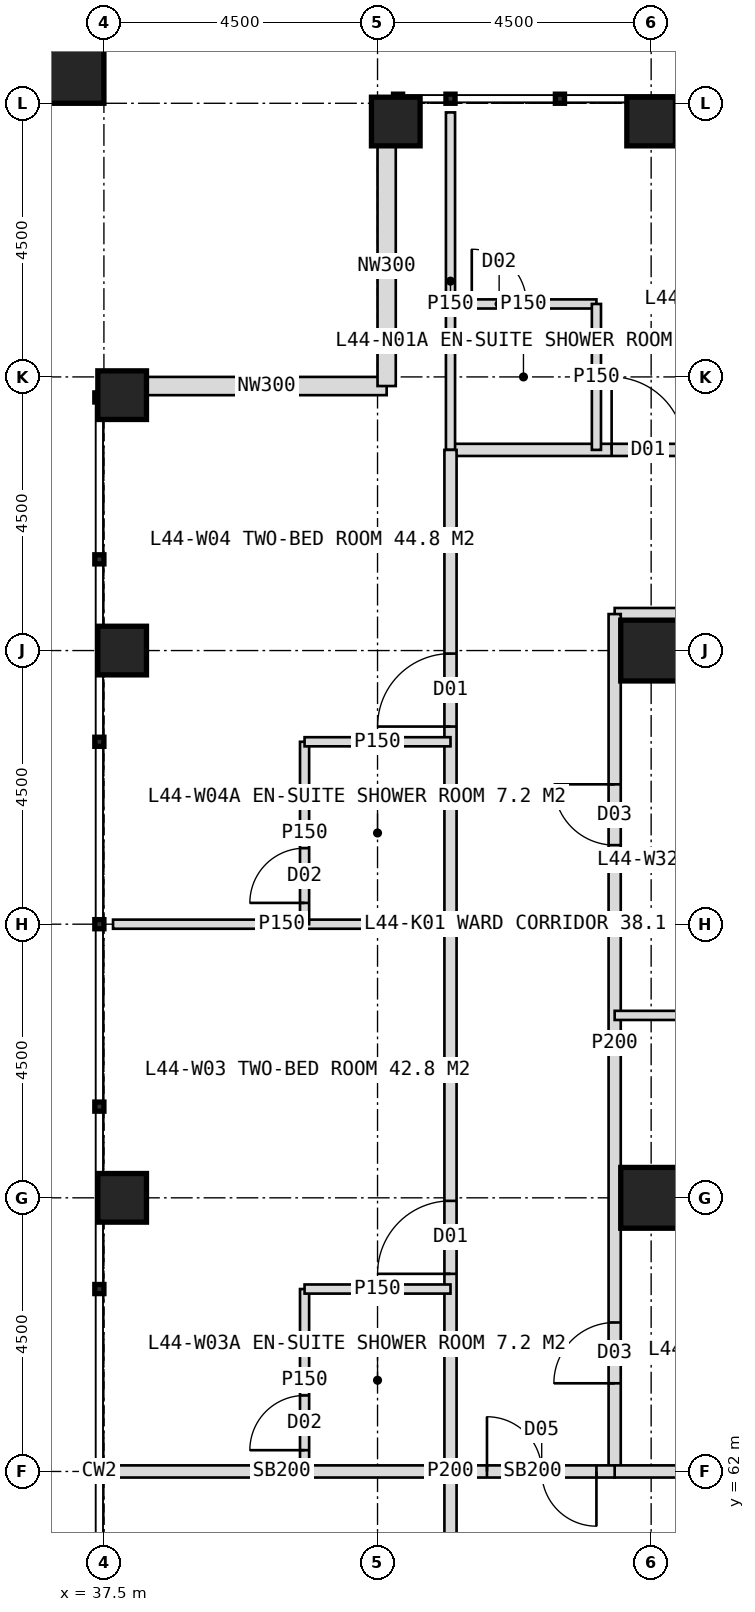
"""IFC4 building model, lengths in metres.
Left out: names, types, materials, properties, quantities, classifications, styles, units other than length and angle.
Written with IfcOpenShell. Run it as: python <this file> out.ifc"""

import sys

from ifc_helpers import new_model, si_unit, direction, frame, frame_2d, origin, origin_2d, place, context, subcontext, project, spatial, rectangle, hollow_rectangle, extrude, element, fill, save


model = new_model("IFC4")
c1 = context("Model", 3, precision=1e-05, world=origin(), true_north=direction((0.0, 1.0)))
c2 = subcontext(c1, "Body", "Model", "MODEL_VIEW")
j1 = project(units=[si_unit("LENGTHUNIT", "METRE"), si_unit("PLANEANGLEUNIT", "RADIAN")], contexts=[c1])
p1 = place(None, origin())
s1 = spatial("IfcSite", under=j1, at=p1, CompositionType="ELEMENT")
p2 = place(p1, origin())
s2 = spatial("IfcBuilding", under=s1, at=p2, CompositionType="ELEMENT")
p3 = place(p2, frame((0.0, 0.0, 185.0)))
s3 = spatial("IfcBuildingStorey", under=s2, at=p3, CompositionType="ELEMENT", Elevation=185.0)
for number, where, z_axis, x_axis in (
    (1, (46.5, 75.5, 0.0), (0.0, 0.0, 1.0), (1.0, 0.0, 0.0)),
    (2, (46.5, 66.5, 0.0), (0.0, 0.0, 1.0), (1.0, 0.0, 0.0)),
):
    element("IfcColumn", number, at=place(p3, frame(where, z_axis=z_axis, x_axis=x_axis)), inside=s3, PredefinedType="COLUMN", context=c2, shape_type="SweptSolid", body=[
        extrude(hollow_rectangle(XDim=1.0, YDim=1.0, WallThickness=0.1, at=origin_2d()), origin(), (0.0, 0.0, 1.0), 4.0),
    ])
for number, where, z_axis, x_axis in (
    (3, (42.3, 84.2, 0.0), (0.0, 0.0, 1.0), (1.0, 0.0, 0.0)),
    (4, (46.5, 84.2, 0.0), (0.0, 0.0, 1.0), (1.0, 0.0, 0.0)),
    (5, (37.8, 66.5, 0.0), (0.0, 0.0, 1.0), (1.0, 0.0, 0.0)),
    (6, (37.8, 75.5, 0.0), (0.0, 0.0, 1.0), (1.0, 0.0, 0.0)),
    (7, (37.8, 79.7, 0.0), (0.0, 0.0, 1.0), (1.0, 0.0, 0.0)),
):
    element("IfcColumn", number, at=place(p3, frame(where, z_axis=z_axis, x_axis=x_axis)), inside=s3, PredefinedType="COLUMN", context=c2, shape_type="SweptSolid", body=[
        extrude(hollow_rectangle(XDim=0.8, YDim=0.8, WallThickness=0.08, at=origin_2d()), origin(), (0.0, 0.0, 1.0), 4.0),
    ])
p4 = place(p3, frame((36.9, 85.1, 0.0), z_axis=(0.0, 0.0, 1.0), x_axis=(1.0, 0.0, 0.0)))
e8 = element("IfcColumn", 8, at=p4, inside=s3, PredefinedType="COLUMN", context=c2, shape_type="SweptSolid", body=[
    extrude(hollow_rectangle(XDim=1.2, YDim=1.2, WallThickness=0.07, at=origin_2d()), origin(), (0.0, 0.0, 1.0), 4.0),
])
for number, where, z_axis, x_axis in (
    (9, (38.2, 79.85, 0.0), (0.0, 0.0, 1.0), (1.0, 0.0, 0.0)),
    (10, (42.15, 79.85, 0.0), (0.0, 0.0, 1.0), (0.0, 1.0, 0.0)),
):
    element("IfcWall", number, at=place(p3, frame(where, z_axis=z_axis, x_axis=x_axis)), inside=s3, PredefinedType="ELEMENTEDWALL", context=c2, shape_type="SweptSolid", body=[
        extrude(rectangle(XDim=3.95, YDim=0.3, at=frame_2d((1.975, 0.0))), origin(), (0.0, 0.0, 1.0), 2.85),
    ])
p5 = place(p3, frame((43.2, 78.8, 0.0), z_axis=(0.0, 0.0, 1.0), x_axis=(1.0, 0.0, 0.0)))
e11 = element("IfcWall", 11, at=p5, inside=s3, PredefinedType="PARTITIONING", context=c2, shape_type="SweptSolid", body=[
    extrude(rectangle(XDim=33.6, YDim=0.2, at=frame_2d((16.8, 0.0))), origin(), (0.0, 0.0, 1.0), 3.75),
])
p6 = place(p5, frame((2.65, 0.0, 0.0)))
e12 = element("IfcOpeningElement", 12, at=p6, cuts=e11, PredefinedType="OPENING", context=c2, shape_type="SweptSolid", body=[
    extrude(rectangle(XDim=1.2, YDim=2.2, at=frame_2d((0.6, 1.1))), frame((0.0, 0.11, 0.0), z_axis=(0.0, -1.0, 0.0), x_axis=(1.0, 0.0, 0.0)), (0.0, 0.0, 1.0), 0.22),
])
p7 = place(p5, frame((14.05, 0.0, 0.0)))
e13 = element("IfcOpeningElement", 13, at=p7, cuts=e11, PredefinedType="OPENING", context=c2, shape_type="SweptSolid", body=[
    extrude(rectangle(XDim=1.2, YDim=2.2, at=frame_2d((0.6, 1.1))), frame((0.0, 0.11, 0.0), z_axis=(0.0, -1.0, 0.0), x_axis=(1.0, 0.0, 0.0)), (0.0, 0.0, 1.0), 0.22),
])
p8 = place(p5, frame((22.45, 0.0, 0.0)))
e14 = element("IfcOpeningElement", 14, at=p8, cuts=e11, PredefinedType="OPENING", context=c2, shape_type="SweptSolid", body=[
    extrude(rectangle(XDim=1.2, YDim=2.2, at=frame_2d((0.6, 1.1))), frame((0.0, 0.11, 0.0), z_axis=(0.0, -1.0, 0.0), x_axis=(1.0, 0.0, 0.0)), (0.0, 0.0, 1.0), 0.22),
])
p9 = place(p5, frame((29.2, 0.0, 0.0)))
e15 = element("IfcOpeningElement", 15, at=p9, cuts=e11, PredefinedType="OPENING", context=c2, shape_type="SweptSolid", body=[
    extrude(rectangle(XDim=1.0, YDim=2.1, at=frame_2d((0.5, 1.05))), frame((0.0, 0.11, 0.0), z_axis=(0.0, -1.0, 0.0), x_axis=(1.0, 0.0, 0.0)), (0.0, 0.0, 1.0), 0.22),
])
p10 = place(p3, frame((43.2, 78.8, 0.0), z_axis=(0.0, 0.0, 1.0), x_axis=(0.0, 1.0, 0.0)))
e16 = element("IfcWall", 16, at=p10, inside=s3, PredefinedType="PARTITIONING", context=c2, shape_type="SweptSolid", body=[
    extrude(rectangle(XDim=5.55, YDim=0.15, at=frame_2d((2.775, 0.0))), origin(), (0.0, 0.0, 1.0), 3.75),
])
p11 = place(p3, frame((43.2, 81.2, 0.0), z_axis=(0.0, 0.0, 1.0), x_axis=(1.0, 0.0, 0.0)))
e17 = element("IfcWall", 17, at=p11, inside=s3, PredefinedType="PARTITIONING", context=c2, shape_type="SweptSolid", body=[
    extrude(rectangle(XDim=2.4, YDim=0.15, at=frame_2d((1.2, 0.0))), origin(), (0.0, 0.0, 1.0), 3.75),
])
p12 = place(p11, frame((0.35, 0.0, 0.0)))
e18 = element("IfcOpeningElement", 18, at=p12, cuts=e17, PredefinedType="OPENING", context=c2, shape_type="SweptSolid", body=[
    extrude(rectangle(XDim=0.9, YDim=2.1, at=frame_2d((0.45, 1.05))), frame((0.0, 0.085, 0.0), z_axis=(0.0, -1.0, 0.0), x_axis=(1.0, 0.0, 0.0)), (0.0, 0.0, 1.0), 0.17),
])
p13 = place(p3, frame((45.6, 78.8, 0.0), z_axis=(0.0, 0.0, 1.0), x_axis=(0.0, 1.0, 0.0)))
e19 = element("IfcWall", 19, at=p13, inside=s3, PredefinedType="PARTITIONING", context=c2, shape_type="SweptSolid", body=[
    extrude(rectangle(XDim=2.4, YDim=0.15, at=frame_2d((1.2, 0.0))), origin(), (0.0, 0.0, 1.0), 3.75),
])
p14 = place(p3, frame((45.9, 76.1, 0.0), z_axis=(0.0, 0.0, 1.0), x_axis=(1.0, 0.0, 0.0)))
e20 = element("IfcWall", 20, at=p14, inside=s3, PredefinedType="PARTITIONING", context=c2, shape_type="SweptSolid", body=[
    extrude(rectangle(XDim=5.1, YDim=0.2, at=frame_2d((2.55, 0.0))), origin(), (0.0, 0.0, 1.0), 3.75),
])
p15 = place(p3, frame((43.2, 62.0, 0.0), z_axis=(0.0, 0.0, 1.0), x_axis=(-1.0, 0.0, 0.0)))
e21 = element("IfcWall", 21, at=p15, inside=s3, PredefinedType="SOLIDWALL", context=c2, shape_type="SweptSolid", body=[
    extrude(rectangle(XDim=5.55, YDim=0.2, at=frame_2d((2.775, 0.0))), origin(), (0.0, 0.0, 1.0), 2.95),
])
p16 = place(p3, frame((43.2, 71.0, 0.0), z_axis=(0.0, 0.0, 1.0), x_axis=(-1.0, 0.0, 0.0)))
e22 = element("IfcWall", 22, at=p16, inside=s3, PredefinedType="PARTITIONING", context=c2, shape_type="SweptSolid", body=[
    extrude(rectangle(XDim=5.55, YDim=0.15, at=frame_2d((2.775, 0.0))), origin(), (0.0, 0.0, 1.0), 3.75),
])
p17 = place(p3, frame((43.2, 45.2, 0.0), z_axis=(0.0, 0.0, 1.0), x_axis=(0.0, 1.0, 0.0)))
e23 = element("IfcWall", 23, at=p17, inside=s3, PredefinedType="PARTITIONING", context=c2, shape_type="SweptSolid", body=[
    extrude(rectangle(XDim=33.6, YDim=0.2, at=frame_2d((16.8, 0.0))), origin(), (0.0, 0.0, 1.0), 3.75),
])
p18 = place(p17, frame((2.65, 0.0, 0.0)))
e24 = element("IfcOpeningElement", 24, at=p18, cuts=e23, PredefinedType="OPENING", context=c2, shape_type="SweptSolid", body=[
    extrude(rectangle(XDim=1.2, YDim=2.2, at=frame_2d((0.6, 1.1))), frame((0.0, 0.11, 0.0), z_axis=(0.0, -1.0, 0.0), x_axis=(1.0, 0.0, 0.0)), (0.0, 0.0, 1.0), 0.22),
])
p19 = place(p17, frame((13.45, 0.0, 0.0)))
e25 = element("IfcOpeningElement", 25, at=p19, cuts=e23, PredefinedType="OPENING", context=c2, shape_type="SweptSolid", body=[
    extrude(rectangle(XDim=1.2, YDim=2.2, at=frame_2d((0.6, 1.1))), frame((0.0, 0.11, 0.0), z_axis=(0.0, -1.0, 0.0), x_axis=(1.0, 0.0, 0.0)), (0.0, 0.0, 1.0), 0.22),
])
p20 = place(p17, frame((20.05, 0.0, 0.0)))
e26 = element("IfcOpeningElement", 26, at=p20, cuts=e23, PredefinedType="OPENING", context=c2, shape_type="SweptSolid", body=[
    extrude(rectangle(XDim=1.2, YDim=2.2, at=frame_2d((0.6, 1.1))), frame((0.0, 0.11, 0.0), z_axis=(0.0, -1.0, 0.0), x_axis=(1.0, 0.0, 0.0)), (0.0, 0.0, 1.0), 0.22),
])
p21 = place(p17, frame((29.05, 0.0, 0.0)))
e27 = element("IfcOpeningElement", 27, at=p21, cuts=e23, PredefinedType="OPENING", context=c2, shape_type="SweptSolid", body=[
    extrude(rectangle(XDim=1.2, YDim=2.2, at=frame_2d((0.6, 1.1))), frame((0.0, 0.11, 0.0), z_axis=(0.0, -1.0, 0.0), x_axis=(1.0, 0.0, 0.0)), (0.0, 0.0, 1.0), 0.22),
])
p22 = place(p3, frame((40.8, 62.0, 0.0), z_axis=(0.0, 0.0, 1.0), x_axis=(0.0, 1.0, 0.0)))
e28 = element("IfcWall", 28, at=p22, inside=s3, PredefinedType="PARTITIONING", context=c2, shape_type="SweptSolid", body=[
    extrude(rectangle(XDim=3.0, YDim=0.15, at=frame_2d((1.5, 0.0))), origin(), (0.0, 0.0, 1.0), 3.75),
])
p23 = place(p22, frame((0.35, 0.0, 0.0)))
e29 = element("IfcOpeningElement", 29, at=p23, cuts=e28, PredefinedType="OPENING", context=c2, shape_type="SweptSolid", body=[
    extrude(rectangle(XDim=0.9, YDim=2.1, at=frame_2d((0.45, 1.05))), frame((0.0, 0.085, 0.0), z_axis=(0.0, -1.0, 0.0), x_axis=(1.0, 0.0, 0.0)), (0.0, 0.0, 1.0), 0.17),
])
p24 = place(p3, frame((43.2, 65.0, 0.0), z_axis=(0.0, 0.0, 1.0), x_axis=(-1.0, 0.0, 0.0)))
e30 = element("IfcWall", 30, at=p24, inside=s3, PredefinedType="PARTITIONING", context=c2, shape_type="SweptSolid", body=[
    extrude(rectangle(XDim=2.4, YDim=0.15, at=frame_2d((1.2, 0.0))), origin(), (0.0, 0.0, 1.0), 3.75),
])
p25 = place(p3, frame((40.8, 71.0, 0.0), z_axis=(0.0, 0.0, 1.0), x_axis=(0.0, 1.0, 0.0)))
e31 = element("IfcWall", 31, at=p25, inside=s3, PredefinedType="PARTITIONING", context=c2, shape_type="SweptSolid", body=[
    extrude(rectangle(XDim=3.0, YDim=0.15, at=frame_2d((1.5, 0.0))), origin(), (0.0, 0.0, 1.0), 3.75),
])
p26 = place(p25, frame((0.35, 0.0, 0.0)))
e32 = element("IfcOpeningElement", 32, at=p26, cuts=e31, PredefinedType="OPENING", context=c2, shape_type="SweptSolid", body=[
    extrude(rectangle(XDim=0.9, YDim=2.1, at=frame_2d((0.45, 1.05))), frame((0.0, 0.085, 0.0), z_axis=(0.0, -1.0, 0.0), x_axis=(1.0, 0.0, 0.0)), (0.0, 0.0, 1.0), 0.17),
])
p27 = place(p3, frame((43.2, 74.0, 0.0), z_axis=(0.0, 0.0, 1.0), x_axis=(-1.0, 0.0, 0.0)))
e33 = element("IfcWall", 33, at=p27, inside=s3, PredefinedType="PARTITIONING", context=c2, shape_type="SweptSolid", body=[
    extrude(rectangle(XDim=2.4, YDim=0.15, at=frame_2d((1.2, 0.0))), origin(), (0.0, 0.0, 1.0), 3.75),
])
p28 = place(p3, frame((45.9, 62.0, 0.0), z_axis=(0.0, 0.0, 1.0), x_axis=(0.0, 1.0, 0.0)))
e34 = element("IfcWall", 34, at=p28, inside=s3, PredefinedType="PARTITIONING", context=c2, shape_type="SweptSolid", body=[
    extrude(rectangle(XDim=14.1, YDim=0.2, at=frame_2d((7.05, 0.0))), origin(), (0.0, 0.0, 1.0), 3.75),
])
p29 = place(p28, frame((1.45, 0.0, 0.0)))
e35 = element("IfcOpeningElement", 35, at=p29, cuts=e34, PredefinedType="OPENING", context=c2, shape_type="SweptSolid", body=[
    extrude(rectangle(XDim=1.0, YDim=2.1, at=frame_2d((0.5, 1.05))), frame((0.0, 0.11, 0.0), z_axis=(0.0, -1.0, 0.0), x_axis=(1.0, 0.0, 0.0)), (0.0, 0.0, 1.0), 0.22),
])
p30 = place(p28, frame((10.3, 0.0, 0.0)))
e36 = element("IfcOpeningElement", 36, at=p30, cuts=e34, PredefinedType="OPENING", context=c2, shape_type="SweptSolid", body=[
    extrude(rectangle(XDim=1.0, YDim=2.1, at=frame_2d((0.5, 1.05))), frame((0.0, 0.11, 0.0), z_axis=(0.0, -1.0, 0.0), x_axis=(1.0, 0.0, 0.0)), (0.0, 0.0, 1.0), 0.22),
])
p31 = place(p3, frame((51.0, 62.0, 0.0), z_axis=(0.0, 0.0, 1.0), x_axis=(-1.0, 0.0, 0.0)))
e37 = element("IfcWall", 37, at=p31, inside=s3, PredefinedType="SOLIDWALL", context=c2, shape_type="SweptSolid", body=[
    extrude(rectangle(XDim=5.1, YDim=0.2, at=frame_2d((2.55, 0.0))), origin(), (0.0, 0.0, 1.0), 2.95),
])
p32 = place(p3, frame((51.0, 69.5, 0.0), z_axis=(0.0, 0.0, 1.0), x_axis=(-1.0, 0.0, 0.0)))
e38 = element("IfcWall", 38, at=p32, inside=s3, PredefinedType="PARTITIONING", context=c2, shape_type="SweptSolid", body=[
    extrude(rectangle(XDim=5.1, YDim=0.15, at=frame_2d((2.55, 0.0))), origin(), (0.0, 0.0, 1.0), 3.75),
])
p33 = place(p3, frame((45.9, 62.0, 0.0), z_axis=(0.0, 0.0, 1.0), x_axis=(-1.0, 0.0, 0.0)))
e39 = element("IfcWall", 39, at=p33, inside=s3, PredefinedType="SOLIDWALL", context=c2, shape_type="SweptSolid", body=[
    extrude(rectangle(XDim=2.7, YDim=0.2, at=frame_2d((1.35, 0.0))), origin(), (0.0, 0.0, 1.0), 2.95),
])
p34 = place(p33, frame((0.3, 0.0, 0.0)))
e40 = element("IfcOpeningElement", 40, at=p34, cuts=e39, PredefinedType="OPENING", context=c2, shape_type="SweptSolid", body=[
    extrude(rectangle(XDim=1.8, YDim=2.2, at=frame_2d((0.9, 1.1))), frame((0.0, 0.11, 0.0), z_axis=(0.0, -1.0, 0.0), x_axis=(1.0, 0.0, 0.0)), (0.0, 0.0, 1.0), 0.22),
])
p35 = place(p6, origin())
e41 = element("IfcDoor", 41, at=p35, inside=s3, OperationType="SINGLE_SWING_LEFT", PredefinedType="DOOR", context=c2, shape_type="SweptSolid", body=[
    extrude(rectangle(XDim=1.2, YDim=2.2, at=frame_2d((0.6, 1.1))), frame((0.0, 0.025, 0.0), z_axis=(0.0, -1.0, 0.0), x_axis=(1.0, 0.0, 0.0)), (0.0, 0.0, 1.0), 0.05),
])
fill(e12, e41)
p36 = place(p12, origin())
e42 = element("IfcDoor", 42, at=p36, inside=s3, OperationType="SINGLE_SWING_LEFT", PredefinedType="DOOR", context=c2, shape_type="SweptSolid", body=[
    extrude(rectangle(XDim=0.9, YDim=2.1, at=frame_2d((0.45, 1.05))), frame((0.0, 0.025, 0.0), z_axis=(0.0, -1.0, 0.0), x_axis=(1.0, 0.0, 0.0)), (0.0, 0.0, 1.0), 0.05),
])
fill(e18, e42)
p37 = place(p20, origin())
e43 = element("IfcDoor", 43, at=p37, inside=s3, OperationType="SINGLE_SWING_LEFT", PredefinedType="DOOR", context=c2, shape_type="SweptSolid", body=[
    extrude(rectangle(XDim=1.2, YDim=2.2, at=frame_2d((0.6, 1.1))), frame((0.0, 0.025, 0.0), z_axis=(0.0, -1.0, 0.0), x_axis=(1.0, 0.0, 0.0)), (0.0, 0.0, 1.0), 0.05),
])
fill(e26, e43)
p38 = place(p23, origin())
e44 = element("IfcDoor", 44, at=p38, inside=s3, OperationType="SINGLE_SWING_LEFT", PredefinedType="DOOR", context=c2, shape_type="SweptSolid", body=[
    extrude(rectangle(XDim=0.9, YDim=2.1, at=frame_2d((0.45, 1.05))), frame((0.0, 0.025, 0.0), z_axis=(0.0, -1.0, 0.0), x_axis=(1.0, 0.0, 0.0)), (0.0, 0.0, 1.0), 0.05),
])
fill(e29, e44)
p39 = place(p21, origin())
e45 = element("IfcDoor", 45, at=p39, inside=s3, OperationType="SINGLE_SWING_LEFT", PredefinedType="DOOR", context=c2, shape_type="SweptSolid", body=[
    extrude(rectangle(XDim=1.2, YDim=2.2, at=frame_2d((0.6, 1.1))), frame((0.0, 0.025, 0.0), z_axis=(0.0, -1.0, 0.0), x_axis=(1.0, 0.0, 0.0)), (0.0, 0.0, 1.0), 0.05),
])
fill(e27, e45)
p40 = place(p26, origin())
e46 = element("IfcDoor", 46, at=p40, inside=s3, OperationType="SINGLE_SWING_LEFT", PredefinedType="DOOR", context=c2, shape_type="SweptSolid", body=[
    extrude(rectangle(XDim=0.9, YDim=2.1, at=frame_2d((0.45, 1.05))), frame((0.0, 0.025, 0.0), z_axis=(0.0, -1.0, 0.0), x_axis=(1.0, 0.0, 0.0)), (0.0, 0.0, 1.0), 0.05),
])
fill(e32, e46)
p41 = place(p29, origin())
e47 = element("IfcDoor", 47, at=p41, inside=s3, OperationType="SINGLE_SWING_LEFT", PredefinedType="DOOR", context=c2, shape_type="SweptSolid", body=[
    extrude(rectangle(XDim=1.0, YDim=2.1, at=frame_2d((0.5, 1.05))), frame((0.0, 0.025, 0.0), z_axis=(0.0, -1.0, 0.0), x_axis=(1.0, 0.0, 0.0)), (0.0, 0.0, 1.0), 0.05),
])
fill(e35, e47)
p42 = place(p30, origin())
e48 = element("IfcDoor", 48, at=p42, inside=s3, OperationType="SINGLE_SWING_RIGHT", PredefinedType="DOOR", context=c2, shape_type="SweptSolid", body=[
    extrude(rectangle(XDim=1.0, YDim=2.1, at=frame_2d((0.5, 1.05))), frame((0.0, 0.025, 0.0), z_axis=(0.0, -1.0, 0.0), x_axis=(1.0, 0.0, 0.0)), (0.0, 0.0, 1.0), 0.05),
])
fill(e36, e48)
p43 = place(p34, origin())
e49 = element("IfcDoor", 49, at=p43, inside=s3, OperationType="DOUBLE_DOOR_DOUBLE_SWING", PredefinedType="DOOR", context=c2, shape_type="SweptSolid", body=[
    extrude(rectangle(XDim=1.8, YDim=2.2, at=frame_2d((0.9, 1.1))), frame((0.0, 0.025, 0.0), z_axis=(0.0, -1.0, 0.0), x_axis=(1.0, 0.0, 0.0)), (0.0, 0.0, 1.0), 0.05),
])
fill(e40, e49)
save(model, sys.argv[1])
